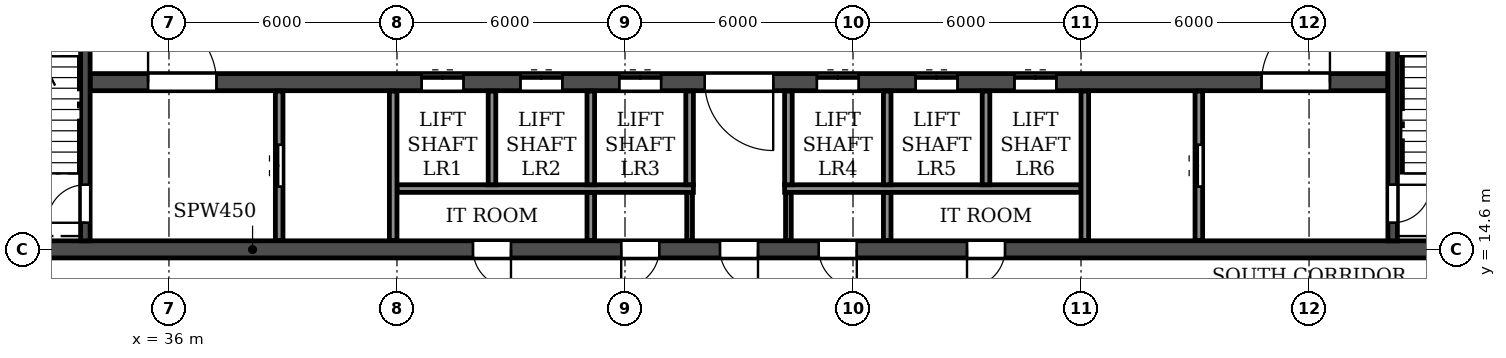
"""IFC4 building model, lengths in metres.
Left out: names, types, materials, properties, quantities, classifications, styles, units other than length and angle.
Written with IfcOpenShell. Run it as: python <this file> out.ifc"""

import sys

from ifc_helpers import new_model, si_unit, direction, frame, frame_2d, origin, place, context, subcontext, project, spatial, rectangle, extrude, element, fill, save


model = new_model("IFC4")
c1 = context("Model", 3, precision=1e-05, world=origin(), true_north=direction((0.0, 1.0)))
c2 = subcontext(c1, "Body", "Model", "MODEL_VIEW")
j1 = project(units=[si_unit("LENGTHUNIT", "METRE"), si_unit("PLANEANGLEUNIT", "RADIAN")], contexts=[c1])
p1 = place(None, origin())
s1 = spatial("IfcSite", under=j1, at=p1, CompositionType="ELEMENT")
p2 = place(p1, origin())
s2 = spatial("IfcBuilding", under=s1, at=p2, CompositionType="ELEMENT")
p3 = place(p2, frame((0.0, 0.0, 15.0)))
s3 = spatial("IfcBuildingStorey", under=s2, at=p3, CompositionType="ELEMENT", Elevation=15.0)
p4 = place(p3, frame((18.0, 14.6, 0.0), z_axis=(0.0, 0.0, 1.0), x_axis=(1.0, 0.0, 0.0)))
e1 = element("IfcWall", 1, at=p4, inside=s3, PredefinedType="SOLIDWALL", context=c2, shape_type="SweptSolid", body=[
    extrude(rectangle(XDim=66.0, YDim=0.45, at=frame_2d((33.0, 0.0))), origin(), (0.0, 0.0, 1.0), 3.92),
])
p5 = place(p4, frame((0.9, 0.0, 0.0)))
e2 = element("IfcOpeningElement", 2, at=p5, cuts=e1, PredefinedType="OPENING", context=c2, shape_type="SweptSolid", body=[
    extrude(rectangle(XDim=1.0, YDim=2.1, at=frame_2d((0.5, 1.05))), frame((0.0, 0.235, 0.0), z_axis=(0.0, -1.0, 0.0), x_axis=(1.0, 0.0, 0.0)), (0.0, 0.0, 1.0), 0.47),
])
p6 = place(p4, frame((8.8, 0.0, 0.0)))
e3 = element("IfcOpeningElement", 3, at=p6, cuts=e1, PredefinedType="OPENING", context=c2, shape_type="SweptSolid", body=[
    extrude(rectangle(XDim=1.0, YDim=2.1, at=frame_2d((0.5, 1.05))), frame((0.0, 0.235, 0.0), z_axis=(0.0, -1.0, 0.0), x_axis=(1.0, 0.0, 0.0)), (0.0, 0.0, 1.0), 0.47),
])
p7 = place(p4, frame((13.4, 0.0, 0.0)))
e4 = element("IfcOpeningElement", 4, at=p7, cuts=e1, PredefinedType="OPENING", context=c2, shape_type="SweptSolid", body=[
    extrude(rectangle(XDim=1.0, YDim=2.1, at=frame_2d((0.5, 1.05))), frame((0.0, 0.235, 0.0), z_axis=(0.0, -1.0, 0.0), x_axis=(1.0, 0.0, 0.0)), (0.0, 0.0, 1.0), 0.47),
])
p8 = place(p4, frame((26.0, 0.0, 0.0)))
e5 = element("IfcOpeningElement", 5, at=p8, cuts=e1, PredefinedType="OPENING", context=c2, shape_type="SweptSolid", body=[
    extrude(rectangle(XDim=1.0, YDim=2.1, at=frame_2d((0.5, 1.05))), frame((0.0, 0.235, 0.0), z_axis=(0.0, -1.0, 0.0), x_axis=(1.0, 0.0, 0.0)), (0.0, 0.0, 1.0), 0.47),
])
p9 = place(p4, frame((29.9, 0.0, 0.0)))
e6 = element("IfcOpeningElement", 6, at=p9, cuts=e1, PredefinedType="OPENING", context=c2, shape_type="SweptSolid", body=[
    extrude(rectangle(XDim=1.0, YDim=2.1, at=frame_2d((0.5, 1.05))), frame((0.0, 0.235, 0.0), z_axis=(0.0, -1.0, 0.0), x_axis=(1.0, 0.0, 0.0)), (0.0, 0.0, 1.0), 0.47),
])
p10 = place(p4, frame((32.5, 0.0, 0.0)))
e7 = element("IfcOpeningElement", 7, at=p10, cuts=e1, PredefinedType="OPENING", context=c2, shape_type="SweptSolid", body=[
    extrude(rectangle(XDim=1.0, YDim=2.1, at=frame_2d((0.5, 1.05))), frame((0.0, 0.235, 0.0), z_axis=(0.0, -1.0, 0.0), x_axis=(1.0, 0.0, 0.0)), (0.0, 0.0, 1.0), 0.47),
])
p11 = place(p4, frame((35.1, 0.0, 0.0)))
e8 = element("IfcOpeningElement", 8, at=p11, cuts=e1, PredefinedType="OPENING", context=c2, shape_type="SweptSolid", body=[
    extrude(rectangle(XDim=1.0, YDim=2.1, at=frame_2d((0.5, 1.05))), frame((0.0, 0.235, 0.0), z_axis=(0.0, -1.0, 0.0), x_axis=(1.0, 0.0, 0.0)), (0.0, 0.0, 1.0), 0.47),
])
p12 = place(p4, frame((39.0, 0.0, 0.0)))
e9 = element("IfcOpeningElement", 9, at=p12, cuts=e1, PredefinedType="OPENING", context=c2, shape_type="SweptSolid", body=[
    extrude(rectangle(XDim=1.0, YDim=2.1, at=frame_2d((0.5, 1.05))), frame((0.0, 0.235, 0.0), z_axis=(0.0, -1.0, 0.0), x_axis=(1.0, 0.0, 0.0)), (0.0, 0.0, 1.0), 0.47),
])
p13 = place(p4, frame((51.6, 0.0, 0.0)))
e10 = element("IfcOpeningElement", 10, at=p13, cuts=e1, PredefinedType="OPENING", context=c2, shape_type="SweptSolid", body=[
    extrude(rectangle(XDim=1.0, YDim=2.1, at=frame_2d((0.5, 1.05))), frame((0.0, 0.235, 0.0), z_axis=(0.0, -1.0, 0.0), x_axis=(1.0, 0.0, 0.0)), (0.0, 0.0, 1.0), 0.47),
])
p14 = place(p4, frame((56.25, 0.0, 0.0)))
e11 = element("IfcOpeningElement", 11, at=p14, cuts=e1, PredefinedType="OPENING", context=c2, shape_type="SweptSolid", body=[
    extrude(rectangle(XDim=0.9, YDim=2.1, at=frame_2d((0.45, 1.05))), frame((0.0, 0.235, 0.0), z_axis=(0.0, -1.0, 0.0), x_axis=(1.0, 0.0, 0.0)), (0.0, 0.0, 1.0), 0.47),
])
p15 = place(p4, frame((64.1, 0.0, 0.0)))
e12 = element("IfcOpeningElement", 12, at=p15, cuts=e1, PredefinedType="OPENING", context=c2, shape_type="SweptSolid", body=[
    extrude(rectangle(XDim=1.0, YDim=2.1, at=frame_2d((0.5, 1.05))), frame((0.0, 0.235, 0.0), z_axis=(0.0, -1.0, 0.0), x_axis=(1.0, 0.0, 0.0)), (0.0, 0.0, 1.0), 0.47),
])
p16 = place(p3, frame((33.925, 19.0, 0.0), z_axis=(0.0, 0.0, 1.0), x_axis=(1.0, 0.0, 0.0)))
e13 = element("IfcWall", 13, at=p16, inside=s3, PredefinedType="SOLIDWALL", context=c2, shape_type="SweptSolid", body=[
    extrude(rectangle(XDim=34.15, YDim=0.45, at=frame_2d((17.075, 0.0))), origin(), (0.0, 0.0, 1.0), 3.92),
])
p17 = place(p16, frame((16.175, 0.0, 0.0)))
e14 = element("IfcOpeningElement", 14, at=p17, cuts=e13, PredefinedType="OPENING", context=c2, shape_type="SweptSolid", body=[
    extrude(rectangle(XDim=1.8, YDim=2.1, at=frame_2d((0.9, 1.05))), frame((0.0, 0.235, 0.0), z_axis=(0.0, -1.0, 0.0), x_axis=(1.0, 0.0, 0.0)), (0.0, 0.0, 1.0), 0.47),
])
p18 = place(p16, frame((1.525, 0.0, 0.0)))
e15 = element("IfcOpeningElement", 15, at=p18, cuts=e13, PredefinedType="OPENING", context=c2, shape_type="SweptSolid", body=[
    extrude(rectangle(XDim=1.8, YDim=2.1, at=frame_2d((0.9, 1.05))), frame((0.0, 0.235, 0.0), z_axis=(0.0, -1.0, 0.0), x_axis=(1.0, 0.0, 0.0)), (0.0, 0.0, 1.0), 0.47),
])
p19 = place(p16, frame((8.725, 0.0, 0.0)))
e16 = element("IfcOpeningElement", 16, at=p19, cuts=e13, PredefinedType="OPENING", context=c2, shape_type="SweptSolid", body=[
    extrude(rectangle(XDim=1.1, YDim=2.1, at=frame_2d((0.55, 1.05))), frame((0.0, 0.235, 0.0), z_axis=(0.0, -1.0, 0.0), x_axis=(1.0, 0.0, 0.0)), (0.0, 0.0, 1.0), 0.47),
])
p20 = place(p16, frame((11.325, 0.0, 0.0)))
e17 = element("IfcOpeningElement", 17, at=p20, cuts=e13, PredefinedType="OPENING", context=c2, shape_type="SweptSolid", body=[
    extrude(rectangle(XDim=1.1, YDim=2.1, at=frame_2d((0.55, 1.05))), frame((0.0, 0.235, 0.0), z_axis=(0.0, -1.0, 0.0), x_axis=(1.0, 0.0, 0.0)), (0.0, 0.0, 1.0), 0.47),
])
p21 = place(p16, frame((13.925, 0.0, 0.0)))
e18 = element("IfcOpeningElement", 18, at=p21, cuts=e13, PredefinedType="OPENING", context=c2, shape_type="SweptSolid", body=[
    extrude(rectangle(XDim=1.1, YDim=2.1, at=frame_2d((0.55, 1.05))), frame((0.0, 0.235, 0.0), z_axis=(0.0, -1.0, 0.0), x_axis=(1.0, 0.0, 0.0)), (0.0, 0.0, 1.0), 0.47),
])
p22 = place(p16, frame((19.125, 0.0, 0.0)))
e19 = element("IfcOpeningElement", 19, at=p22, cuts=e13, PredefinedType="OPENING", context=c2, shape_type="SweptSolid", body=[
    extrude(rectangle(XDim=1.1, YDim=2.1, at=frame_2d((0.55, 1.05))), frame((0.0, 0.235, 0.0), z_axis=(0.0, -1.0, 0.0), x_axis=(1.0, 0.0, 0.0)), (0.0, 0.0, 1.0), 0.47),
])
p23 = place(p16, frame((21.725, 0.0, 0.0)))
e20 = element("IfcOpeningElement", 20, at=p23, cuts=e13, PredefinedType="OPENING", context=c2, shape_type="SweptSolid", body=[
    extrude(rectangle(XDim=1.1, YDim=2.1, at=frame_2d((0.55, 1.05))), frame((0.0, 0.235, 0.0), z_axis=(0.0, -1.0, 0.0), x_axis=(1.0, 0.0, 0.0)), (0.0, 0.0, 1.0), 0.47),
])
p24 = place(p16, frame((24.325, 0.0, 0.0)))
e21 = element("IfcOpeningElement", 21, at=p24, cuts=e13, PredefinedType="OPENING", context=c2, shape_type="SweptSolid", body=[
    extrude(rectangle(XDim=1.1, YDim=2.1, at=frame_2d((0.55, 1.05))), frame((0.0, 0.235, 0.0), z_axis=(0.0, -1.0, 0.0), x_axis=(1.0, 0.0, 0.0)), (0.0, 0.0, 1.0), 0.47),
])
p25 = place(p16, frame((30.825, 0.0, 0.0)))
e22 = element("IfcOpeningElement", 22, at=p25, cuts=e13, PredefinedType="OPENING", context=c2, shape_type="SweptSolid", body=[
    extrude(rectangle(XDim=1.8, YDim=2.1, at=frame_2d((0.9, 1.05))), frame((0.0, 0.235, 0.0), z_axis=(0.0, -1.0, 0.0), x_axis=(1.0, 0.0, 0.0)), (0.0, 0.0, 1.0), 0.47),
])
p26 = place(p3, frame((33.8, 14.825, 0.0), z_axis=(0.0, 0.0, 1.0), x_axis=(0.0, 1.0, 0.0)))
e23 = element("IfcWall", 23, at=p26, inside=s3, PredefinedType="SOLIDWALL", context=c2, shape_type="SweptSolid", body=[
    extrude(rectangle(XDim=7.65, YDim=0.25, at=frame_2d((3.825, 0.0))), origin(), (0.0, 0.0, 1.0), 3.92),
])
p27 = place(p26, frame((0.475, 0.0, 0.0)))
e24 = element("IfcOpeningElement", 24, at=p27, cuts=e23, PredefinedType="OPENING", context=c2, shape_type="SweptSolid", body=[
    extrude(rectangle(XDim=1.0, YDim=2.1, at=frame_2d((0.5, 1.05))), frame((0.0, 0.135, 0.0), z_axis=(0.0, -1.0, 0.0), x_axis=(1.0, 0.0, 0.0)), (0.0, 0.0, 1.0), 0.27),
])
p28 = place(p3, frame((68.2, 14.825, 0.0), z_axis=(0.0, 0.0, 1.0), x_axis=(0.0, 1.0, 0.0)))
e25 = element("IfcWall", 25, at=p28, inside=s3, PredefinedType="SOLIDWALL", context=c2, shape_type="SweptSolid", body=[
    extrude(rectangle(XDim=7.65, YDim=0.25, at=frame_2d((3.825, 0.0))), origin(), (0.0, 0.0, 1.0), 3.92),
])
p29 = place(p28, frame((0.475, 0.0, 0.0)))
e26 = element("IfcOpeningElement", 26, at=p29, cuts=e25, PredefinedType="OPENING", context=c2, shape_type="SweptSolid", body=[
    extrude(rectangle(XDim=1.0, YDim=2.1, at=frame_2d((0.5, 1.05))), frame((0.0, 0.135, 0.0), z_axis=(0.0, -1.0, 0.0), x_axis=(1.0, 0.0, 0.0)), (0.0, 0.0, 1.0), 0.27),
])
for number, where, z_axis, x_axis in (
    (27, (49.7, 14.835, 0.0), (0.0, 0.0, 1.0), (0.0, 1.0, 0.0)),
    (28, (52.3, 14.835, 0.0), (0.0, 0.0, 1.0), (0.0, 1.0, 0.0)),
):
    element("IfcWall", number, at=place(p3, frame(where, z_axis=z_axis, x_axis=x_axis)), inside=s3, PredefinedType="PARTITIONING", context=c2, shape_type="SweptSolid", body=[
        extrude(rectangle(XDim=1.265, YDim=0.15, at=frame_2d((0.633, 0.0))), origin(), (0.0, 0.0, 1.0), 3.92),
    ])
for number, where, z_axis, x_axis in (
    (29, (47.1, 14.835, 0.0), (0.0, 0.0, 1.0), (0.0, 1.0, 0.0)),
    (30, (54.9, 14.835, 0.0), (0.0, 0.0, 1.0), (0.0, 1.0, 0.0)),
):
    element("IfcWall", number, at=place(p3, frame(where, z_axis=z_axis, x_axis=x_axis)), inside=s3, PredefinedType="PARTITIONING", context=c2, shape_type="SweptSolid", body=[
        extrude(rectangle(XDim=1.265, YDim=0.2, at=frame_2d((0.633, 0.0))), origin(), (0.0, 0.0, 1.0), 3.92),
    ])
for number, where, z_axis, x_axis in (
    (31, (42.0, 16.2, 0.0), (0.0, 0.0, 1.0), (1.0, 0.0, 0.0)),
    (32, (52.2, 16.2, 0.0), (0.0, 0.0, 1.0), (1.0, 0.0, 0.0)),
):
    element("IfcWall", number, at=place(p3, frame(where, z_axis=z_axis, x_axis=x_axis)), inside=s3, PredefinedType="PARTITIONING", context=c2, shape_type="SweptSolid", body=[
        extrude(rectangle(XDim=7.8, YDim=0.2, at=frame_2d((3.9, 0.0))), origin(), (0.0, 0.0, 1.0), 3.92),
    ])
p30 = place(p3, frame((38.9, 14.835, 0.0), z_axis=(0.0, 0.0, 1.0), x_axis=(0.0, 1.0, 0.0)))
e33 = element("IfcWall", 33, at=p30, inside=s3, PredefinedType="PARTITIONING", context=c2, shape_type="SweptSolid", body=[
    extrude(rectangle(XDim=3.93, YDim=0.2, at=frame_2d((1.965, 0.0))), origin(), (0.0, 0.0, 1.0), 3.92),
])
p31 = place(p30, frame((1.415, 0.0, 0.0)))
e34 = element("IfcOpeningElement", 34, at=p31, cuts=e33, PredefinedType="OPENING", context=c2, shape_type="SweptSolid", body=[
    extrude(rectangle(XDim=1.1, YDim=2.1, at=frame_2d((0.55, 1.05))), frame((0.0, 0.11, 0.0), z_axis=(0.0, -1.0, 0.0), x_axis=(1.0, 0.0, 0.0)), (0.0, 0.0, 1.0), 0.22),
])
p32 = place(p3, frame((41.9, 14.835, 0.0), z_axis=(0.0, 0.0, 1.0), x_axis=(0.0, 1.0, 0.0)))
e35 = element("IfcWall", 35, at=p32, inside=s3, PredefinedType="PARTITIONING", context=c2, shape_type="SweptSolid", body=[
    extrude(rectangle(XDim=3.93, YDim=0.2, at=frame_2d((1.965, 0.0))), origin(), (0.0, 0.0, 1.0), 3.92),
])
for number, where, z_axis, x_axis in (
    (36, (44.5, 16.3, 0.0), (0.0, 0.0, 1.0), (0.0, 1.0, 0.0)),
    (37, (47.1, 16.3, 0.0), (0.0, 0.0, 1.0), (0.0, 1.0, 0.0)),
    (38, (49.7, 16.3, 0.0), (0.0, 0.0, 1.0), (0.0, 1.0, 0.0)),
    (39, (52.3, 16.3, 0.0), (0.0, 0.0, 1.0), (0.0, 1.0, 0.0)),
    (40, (54.9, 16.3, 0.0), (0.0, 0.0, 1.0), (0.0, 1.0, 0.0)),
    (41, (57.5, 16.3, 0.0), (0.0, 0.0, 1.0), (0.0, 1.0, 0.0)),
):
    element("IfcWall", number, at=place(p3, frame(where, z_axis=z_axis, x_axis=x_axis)), inside=s3, PredefinedType="PARTITIONING", context=c2, shape_type="SweptSolid", body=[
        extrude(rectangle(XDim=2.465, YDim=0.2, at=frame_2d((1.232, 0.0))), origin(), (0.0, 0.0, 1.0), 3.92),
    ])
p33 = place(p3, frame((60.1, 14.835, 0.0), z_axis=(0.0, 0.0, 1.0), x_axis=(0.0, 1.0, 0.0)))
e42 = element("IfcWall", 42, at=p33, inside=s3, PredefinedType="PARTITIONING", context=c2, shape_type="SweptSolid", body=[
    extrude(rectangle(XDim=3.93, YDim=0.2, at=frame_2d((1.965, 0.0))), origin(), (0.0, 0.0, 1.0), 3.92),
])
p34 = place(p3, frame((63.1, 14.835, 0.0), z_axis=(0.0, 0.0, 1.0), x_axis=(0.0, 1.0, 0.0)))
e43 = element("IfcWall", 43, at=p34, inside=s3, PredefinedType="PARTITIONING", context=c2, shape_type="SweptSolid", body=[
    extrude(rectangle(XDim=3.93, YDim=0.2, at=frame_2d((1.965, 0.0))), origin(), (0.0, 0.0, 1.0), 3.92),
])
p35 = place(p34, frame((1.415, 0.0, 0.0)))
e44 = element("IfcOpeningElement", 44, at=p35, cuts=e43, PredefinedType="OPENING", context=c2, shape_type="SweptSolid", body=[
    extrude(rectangle(XDim=1.1, YDim=2.1, at=frame_2d((0.55, 1.05))), frame((0.0, 0.11, 0.0), z_axis=(0.0, -1.0, 0.0), x_axis=(1.0, 0.0, 0.0)), (0.0, 0.0, 1.0), 0.22),
])
p36 = place(p8, frame((1.0, 0.0, 0.0), z_axis=(0.0, 0.0, 1.0), x_axis=(-1.0, 0.0, 0.0)))
e45 = element("IfcDoor", 45, at=p36, inside=s3, OperationType="SINGLE_SWING_LEFT", PredefinedType="DOOR", context=c2, shape_type="SweptSolid", body=[
    extrude(rectangle(XDim=1.0, YDim=2.1, at=frame_2d((0.5, 1.05))), frame((0.0, 0.025, 0.0), z_axis=(0.0, -1.0, 0.0), x_axis=(1.0, 0.0, 0.0)), (0.0, 0.0, 1.0), 0.05),
])
fill(e5, e45)
p37 = place(p9, frame((1.0, 0.0, 0.0), z_axis=(0.0, 0.0, 1.0), x_axis=(-1.0, 0.0, 0.0)))
e46 = element("IfcDoor", 46, at=p37, inside=s3, OperationType="SINGLE_SWING_RIGHT", PredefinedType="DOOR", context=c2, shape_type="SweptSolid", body=[
    extrude(rectangle(XDim=1.0, YDim=2.1, at=frame_2d((0.5, 1.05))), frame((0.0, 0.025, 0.0), z_axis=(0.0, -1.0, 0.0), x_axis=(1.0, 0.0, 0.0)), (0.0, 0.0, 1.0), 0.05),
])
fill(e6, e46)
p38 = place(p10, frame((1.0, 0.0, 0.0), z_axis=(0.0, 0.0, 1.0), x_axis=(-1.0, 0.0, 0.0)))
e47 = element("IfcDoor", 47, at=p38, inside=s3, OperationType="SINGLE_SWING_LEFT", PredefinedType="DOOR", context=c2, shape_type="SweptSolid", body=[
    extrude(rectangle(XDim=1.0, YDim=2.1, at=frame_2d((0.5, 1.05))), frame((0.0, 0.025, 0.0), z_axis=(0.0, -1.0, 0.0), x_axis=(1.0, 0.0, 0.0)), (0.0, 0.0, 1.0), 0.05),
])
fill(e7, e47)
p39 = place(p11, frame((1.0, 0.0, 0.0), z_axis=(0.0, 0.0, 1.0), x_axis=(-1.0, 0.0, 0.0)))
e48 = element("IfcDoor", 48, at=p39, inside=s3, OperationType="SINGLE_SWING_LEFT", PredefinedType="DOOR", context=c2, shape_type="SweptSolid", body=[
    extrude(rectangle(XDim=1.0, YDim=2.1, at=frame_2d((0.5, 1.05))), frame((0.0, 0.025, 0.0), z_axis=(0.0, -1.0, 0.0), x_axis=(1.0, 0.0, 0.0)), (0.0, 0.0, 1.0), 0.05),
])
fill(e8, e48)
p40 = place(p12, frame((1.0, 0.0, 0.0), z_axis=(0.0, 0.0, 1.0), x_axis=(-1.0, 0.0, 0.0)))
e49 = element("IfcDoor", 49, at=p40, inside=s3, OperationType="SINGLE_SWING_RIGHT", PredefinedType="DOOR", context=c2, shape_type="SweptSolid", body=[
    extrude(rectangle(XDim=1.0, YDim=2.1, at=frame_2d((0.5, 1.05))), frame((0.0, 0.025, 0.0), z_axis=(0.0, -1.0, 0.0), x_axis=(1.0, 0.0, 0.0)), (0.0, 0.0, 1.0), 0.05),
])
fill(e9, e49)
p41 = place(p35, origin())
e50 = element("IfcDoor", 50, at=p41, inside=s3, OperationType="DOUBLE_DOOR_SLIDING", PredefinedType="DOOR", context=c2, shape_type="SweptSolid", body=[
    extrude(rectangle(XDim=1.1, YDim=2.1, at=frame_2d((0.55, 1.05))), frame((0.0, 0.025, 0.0), z_axis=(0.0, -1.0, 0.0), x_axis=(1.0, 0.0, 0.0)), (0.0, 0.0, 1.0), 0.05),
])
fill(e44, e50)
p42 = place(p29, frame((1.0, 0.0, 0.0), z_axis=(0.0, 0.0, 1.0), x_axis=(-1.0, 0.0, 0.0)))
e51 = element("IfcDoor", 51, at=p42, inside=s3, OperationType="SINGLE_SWING_LEFT", PredefinedType="DOOR", context=c2, shape_type="SweptSolid", body=[
    extrude(rectangle(XDim=1.0, YDim=2.1, at=frame_2d((0.5, 1.05))), frame((0.0, 0.025, 0.0), z_axis=(0.0, -1.0, 0.0), x_axis=(1.0, 0.0, 0.0)), (0.0, 0.0, 1.0), 0.05),
])
fill(e26, e51)
p43 = place(p27, origin())
e52 = element("IfcDoor", 52, at=p43, inside=s3, OperationType="SINGLE_SWING_LEFT", PredefinedType="DOOR", context=c2, shape_type="SweptSolid", body=[
    extrude(rectangle(XDim=1.0, YDim=2.1, at=frame_2d((0.5, 1.05))), frame((0.0, 0.025, 0.0), z_axis=(0.0, -1.0, 0.0), x_axis=(1.0, 0.0, 0.0)), (0.0, 0.0, 1.0), 0.05),
])
fill(e24, e52)
p44 = place(p31, origin())
e53 = element("IfcDoor", 53, at=p44, inside=s3, OperationType="DOUBLE_DOOR_SLIDING", PredefinedType="DOOR", context=c2, shape_type="SweptSolid", body=[
    extrude(rectangle(XDim=1.1, YDim=2.1, at=frame_2d((0.55, 1.05))), frame((0.0, 0.025, 0.0), z_axis=(0.0, -1.0, 0.0), x_axis=(1.0, 0.0, 0.0)), (0.0, 0.0, 1.0), 0.05),
])
fill(e34, e53)
p45 = place(p17, frame((1.8, 0.0, 0.0), z_axis=(0.0, 0.0, 1.0), x_axis=(-1.0, 0.0, 0.0)))
e54 = element("IfcDoor", 54, at=p45, inside=s3, OperationType="DOUBLE_DOOR_SINGLE_SWING", PredefinedType="DOOR", context=c2, shape_type="SweptSolid", body=[
    extrude(rectangle(XDim=1.8, YDim=2.1, at=frame_2d((0.9, 1.05))), frame((0.0, 0.025, 0.0), z_axis=(0.0, -1.0, 0.0), x_axis=(1.0, 0.0, 0.0)), (0.0, 0.0, 1.0), 0.05),
])
fill(e14, e54)
p46 = place(p18, origin())
e55 = element("IfcDoor", 55, at=p46, inside=s3, OperationType="DOUBLE_DOOR_SINGLE_SWING", PredefinedType="DOOR", context=c2, shape_type="SweptSolid", body=[
    extrude(rectangle(XDim=1.8, YDim=2.1, at=frame_2d((0.9, 1.05))), frame((0.0, 0.025, 0.0), z_axis=(0.0, -1.0, 0.0), x_axis=(1.0, 0.0, 0.0)), (0.0, 0.0, 1.0), 0.05),
])
fill(e15, e55)
p47 = place(p19, origin())
e56 = element("IfcDoor", 56, at=p47, inside=s3, OperationType="DOUBLE_DOOR_SLIDING", PredefinedType="DOOR", context=c2, shape_type="SweptSolid", body=[
    extrude(rectangle(XDim=1.1, YDim=2.1, at=frame_2d((0.55, 1.05))), frame((0.0, 0.025, 0.0), z_axis=(0.0, -1.0, 0.0), x_axis=(1.0, 0.0, 0.0)), (0.0, 0.0, 1.0), 0.05),
])
fill(e16, e56)
p48 = place(p20, origin())
e57 = element("IfcDoor", 57, at=p48, inside=s3, OperationType="DOUBLE_DOOR_SLIDING", PredefinedType="DOOR", context=c2, shape_type="SweptSolid", body=[
    extrude(rectangle(XDim=1.1, YDim=2.1, at=frame_2d((0.55, 1.05))), frame((0.0, 0.025, 0.0), z_axis=(0.0, -1.0, 0.0), x_axis=(1.0, 0.0, 0.0)), (0.0, 0.0, 1.0), 0.05),
])
fill(e17, e57)
p49 = place(p21, origin())
e58 = element("IfcDoor", 58, at=p49, inside=s3, OperationType="DOUBLE_DOOR_SLIDING", PredefinedType="DOOR", context=c2, shape_type="SweptSolid", body=[
    extrude(rectangle(XDim=1.1, YDim=2.1, at=frame_2d((0.55, 1.05))), frame((0.0, 0.025, 0.0), z_axis=(0.0, -1.0, 0.0), x_axis=(1.0, 0.0, 0.0)), (0.0, 0.0, 1.0), 0.05),
])
fill(e18, e58)
p50 = place(p22, origin())
e59 = element("IfcDoor", 59, at=p50, inside=s3, OperationType="DOUBLE_DOOR_SLIDING", PredefinedType="DOOR", context=c2, shape_type="SweptSolid", body=[
    extrude(rectangle(XDim=1.1, YDim=2.1, at=frame_2d((0.55, 1.05))), frame((0.0, 0.025, 0.0), z_axis=(0.0, -1.0, 0.0), x_axis=(1.0, 0.0, 0.0)), (0.0, 0.0, 1.0), 0.05),
])
fill(e19, e59)
p51 = place(p23, origin())
e60 = element("IfcDoor", 60, at=p51, inside=s3, OperationType="DOUBLE_DOOR_SLIDING", PredefinedType="DOOR", context=c2, shape_type="SweptSolid", body=[
    extrude(rectangle(XDim=1.1, YDim=2.1, at=frame_2d((0.55, 1.05))), frame((0.0, 0.025, 0.0), z_axis=(0.0, -1.0, 0.0), x_axis=(1.0, 0.0, 0.0)), (0.0, 0.0, 1.0), 0.05),
])
fill(e20, e60)
p52 = place(p24, origin())
e61 = element("IfcDoor", 61, at=p52, inside=s3, OperationType="DOUBLE_DOOR_SLIDING", PredefinedType="DOOR", context=c2, shape_type="SweptSolid", body=[
    extrude(rectangle(XDim=1.1, YDim=2.1, at=frame_2d((0.55, 1.05))), frame((0.0, 0.025, 0.0), z_axis=(0.0, -1.0, 0.0), x_axis=(1.0, 0.0, 0.0)), (0.0, 0.0, 1.0), 0.05),
])
fill(e21, e61)
p53 = place(p25, origin())
e62 = element("IfcDoor", 62, at=p53, inside=s3, OperationType="DOUBLE_DOOR_SINGLE_SWING", PredefinedType="DOOR", context=c2, shape_type="SweptSolid", body=[
    extrude(rectangle(XDim=1.8, YDim=2.1, at=frame_2d((0.9, 1.05))), frame((0.0, 0.025, 0.0), z_axis=(0.0, -1.0, 0.0), x_axis=(1.0, 0.0, 0.0)), (0.0, 0.0, 1.0), 0.05),
])
fill(e22, e62)
save(model, sys.argv[1])
